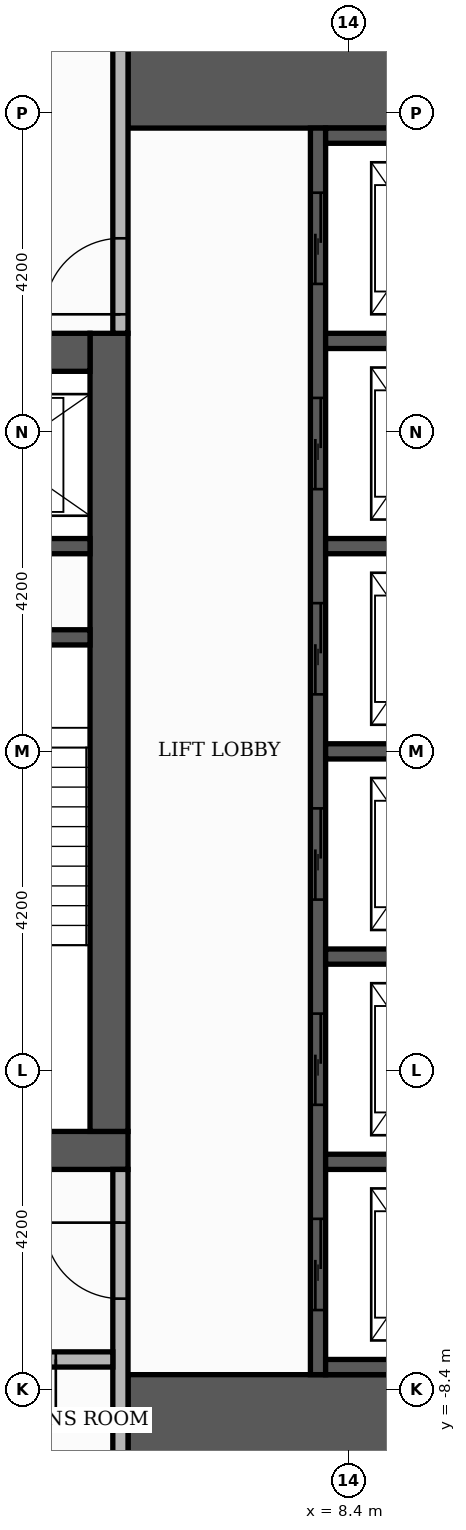
"""IFC4 building model, lengths in metres.
Left out: names, types, materials, properties, quantities, classifications, styles, units other than length and angle.
Written with IfcOpenShell. Run it as: python <this file> out.ifc"""

import sys

from ifc_helpers import new_model, si_unit, direction, frame, frame_2d, origin, place, context, subcontext, project, spatial, rectangle, extrude, element, fill, save


model = new_model("IFC4")
c1 = context("Model", 3, precision=1e-05, world=origin(), true_north=direction((0.0, 1.0)))
c2 = subcontext(c1, "Body", "Model", "MODEL_VIEW")
j1 = project(units=[si_unit("LENGTHUNIT", "METRE"), si_unit("PLANEANGLEUNIT", "RADIAN")], contexts=[c1])
p1 = place(None, origin())
s1 = spatial("IfcSite", under=j1, at=p1, CompositionType="ELEMENT")
p2 = place(p1, origin())
s2 = spatial("IfcBuilding", under=s1, at=p2, CompositionType="ELEMENT")
p3 = place(p2, frame((0.0, 0.0, 176.7)))
s3 = spatial("IfcBuildingStorey", under=s2, at=p3, CompositionType="ELEMENT", Elevation=176.7)
p4 = place(p3, frame((-5.5, -5.25, 0.0), z_axis=(0.0, 0.0, 1.0), x_axis=(1.0, 0.0, 0.0)))
e1 = element("IfcWall", 1, at=p4, inside=s3, PredefinedType="SHEAR", context=c2, shape_type="SweptSolid", body=[
    extrude(rectangle(XDim=11.0, YDim=0.5, at=frame_2d((5.5, 0.0))), origin(), (0.0, 0.0, 1.0), 3.4),
])
p5 = place(p4, frame((4.9, 0.0, 0.0)))
e2 = element("IfcOpeningElement", 2, at=p5, cuts=e1, PredefinedType="OPENING", context=c2, shape_type="SweptSolid", body=[
    extrude(rectangle(XDim=1.2, YDim=2.1, at=frame_2d((0.6, 1.05))), frame((0.0, 0.26, 0.0), z_axis=(0.0, -1.0, 0.0), x_axis=(1.0, 0.0, 0.0)), (0.0, 0.0, 1.0), 0.52),
])
p6 = place(p3, frame((5.25, -5.0, 0.0), z_axis=(0.0, 0.0, 1.0), x_axis=(0.0, 1.0, 0.0)))
e3 = element("IfcWall", 3, at=p6, inside=s3, PredefinedType="SHEAR", context=c2, shape_type="SweptSolid", body=[
    extrude(rectangle(XDim=10.5, YDim=0.5, at=frame_2d((5.25, 0.0))), origin(), (0.0, 0.0, 1.0), 3.4),
])
p7 = place(p3, frame((-5.0, 5.25, 0.0), z_axis=(0.0, 0.0, 1.0), x_axis=(1.0, 0.0, 0.0)))
e4 = element("IfcWall", 4, at=p7, inside=s3, PredefinedType="SHEAR", context=c2, shape_type="SweptSolid", body=[
    extrude(rectangle(XDim=10.0, YDim=0.5, at=frame_2d((5.0, 0.0))), origin(), (0.0, 0.0, 1.0), 3.4),
])
p8 = place(p7, frame((4.4, 0.0, 0.0)))
e5 = element("IfcOpeningElement", 5, at=p8, cuts=e4, PredefinedType="OPENING", context=c2, shape_type="SweptSolid", body=[
    extrude(rectangle(XDim=1.2, YDim=2.1, at=frame_2d((0.6, 1.05))), frame((0.0, 0.26, 0.0), z_axis=(0.0, -1.0, 0.0), x_axis=(1.0, 0.0, 0.0)), (0.0, 0.0, 1.0), 0.52),
])
for number, where, z_axis, x_axis in (
    (6, (5.5, -9.15, 0.0), (0.0, 0.0, 1.0), (1.0, 0.0, 0.0)),
    (7, (5.5, 9.15, 0.0), (0.0, 0.0, 1.0), (1.0, 0.0, 0.0)),
):
    element("IfcWall", number, at=place(p3, frame(where, z_axis=z_axis, x_axis=x_axis)), inside=s3, PredefinedType="SHEAR", context=c2, shape_type="SweptSolid", body=[
        extrude(rectangle(XDim=4.6, YDim=1.9, at=frame_2d((2.3, 0.0))), origin(), (0.0, 0.0, 1.0), 3.4),
    ])
p9 = place(p3, frame((2.15, 1.5, 0.0), z_axis=(0.0, 0.0, 1.0), x_axis=(1.0, 0.0, 0.0)))
e8 = element("IfcWall", 8, at=p9, inside=s3, PredefinedType="SHEAR", context=c2, shape_type="SweptSolid", body=[
    extrude(rectangle(XDim=2.85, YDim=0.2, at=frame_2d((1.425, 0.0))), origin(), (0.0, 0.0, 1.0), 3.4),
])
p10 = place(p3, frame((8.0, -8.2, 0.0), z_axis=(0.0, 0.0, 1.0), x_axis=(0.0, 1.0, 0.0)))
e9 = element("IfcWall", 9, at=p10, inside=s3, PredefinedType="SHEAR", context=c2, shape_type="SweptSolid", body=[
    extrude(rectangle(XDim=16.4, YDim=0.2, at=frame_2d((8.2, 0.0))), origin(), (0.0, 0.0, 1.0), 3.4),
])
p11 = place(p10, frame((0.85, 0.0, 0.0)))
e10 = element("IfcOpeningElement", 10, at=p11, cuts=e9, PredefinedType="OPENING", context=c2, shape_type="SweptSolid", body=[
    extrude(rectangle(XDim=1.2, YDim=2.1, at=frame_2d((0.6, 1.05))), frame((0.0, 0.11, 0.0), z_axis=(0.0, -1.0, 0.0), x_axis=(1.0, 0.0, 0.0)), (0.0, 0.0, 1.0), 0.22),
])
p12 = place(p10, frame((3.55, 0.0, 0.0)))
e11 = element("IfcOpeningElement", 11, at=p12, cuts=e9, PredefinedType="OPENING", context=c2, shape_type="SweptSolid", body=[
    extrude(rectangle(XDim=1.2, YDim=2.1, at=frame_2d((0.6, 1.05))), frame((0.0, 0.11, 0.0), z_axis=(0.0, -1.0, 0.0), x_axis=(1.0, 0.0, 0.0)), (0.0, 0.0, 1.0), 0.22),
])
p13 = place(p10, frame((6.25, 0.0, 0.0)))
e12 = element("IfcOpeningElement", 12, at=p13, cuts=e9, PredefinedType="OPENING", context=c2, shape_type="SweptSolid", body=[
    extrude(rectangle(XDim=1.2, YDim=2.1, at=frame_2d((0.6, 1.05))), frame((0.0, 0.11, 0.0), z_axis=(0.0, -1.0, 0.0), x_axis=(1.0, 0.0, 0.0)), (0.0, 0.0, 1.0), 0.22),
])
p14 = place(p10, frame((8.95, 0.0, 0.0)))
e13 = element("IfcOpeningElement", 13, at=p14, cuts=e9, PredefinedType="OPENING", context=c2, shape_type="SweptSolid", body=[
    extrude(rectangle(XDim=1.2, YDim=2.1, at=frame_2d((0.6, 1.05))), frame((0.0, 0.11, 0.0), z_axis=(0.0, -1.0, 0.0), x_axis=(1.0, 0.0, 0.0)), (0.0, 0.0, 1.0), 0.22),
])
p15 = place(p10, frame((11.65, 0.0, 0.0)))
e14 = element("IfcOpeningElement", 14, at=p15, cuts=e9, PredefinedType="OPENING", context=c2, shape_type="SweptSolid", body=[
    extrude(rectangle(XDim=1.2, YDim=2.1, at=frame_2d((0.6, 1.05))), frame((0.0, 0.11, 0.0), z_axis=(0.0, -1.0, 0.0), x_axis=(1.0, 0.0, 0.0)), (0.0, 0.0, 1.0), 0.22),
])
p16 = place(p10, frame((14.35, 0.0, 0.0)))
e15 = element("IfcOpeningElement", 15, at=p16, cuts=e9, PredefinedType="OPENING", context=c2, shape_type="SweptSolid", body=[
    extrude(rectangle(XDim=1.2, YDim=2.1, at=frame_2d((0.6, 1.05))), frame((0.0, 0.11, 0.0), z_axis=(0.0, -1.0, 0.0), x_axis=(1.0, 0.0, 0.0)), (0.0, 0.0, 1.0), 0.22),
])
for number, where, z_axis, x_axis in (
    (16, (8.1, -8.1, 0.0), (0.0, 0.0, 1.0), (1.0, 0.0, 0.0)),
    (17, (8.1, -5.4, 0.0), (0.0, 0.0, 1.0), (1.0, 0.0, 0.0)),
    (18, (8.1, -2.7, 0.0), (0.0, 0.0, 1.0), (1.0, 0.0, 0.0)),
    (19, (8.1, 0.0, 0.0), (0.0, 0.0, 1.0), (1.0, 0.0, 0.0)),
):
    element("IfcWall", number, at=place(p3, frame(where, z_axis=z_axis, x_axis=x_axis)), inside=s3, PredefinedType="SHEAR", context=c2, shape_type="SweptSolid", body=[
        extrude(rectangle(XDim=2.0, YDim=0.2, at=frame_2d((1.0, 0.0))), origin(), (0.0, 0.0, 1.0), 3.4),
    ])
p17 = place(p3, frame((2.15, 2.7, 0.0), z_axis=(0.0, 0.0, 1.0), x_axis=(1.0, 0.0, 0.0)))
e20 = element("IfcWall", 20, at=p17, inside=s3, PredefinedType="SHEAR", context=c2, shape_type="SweptSolid", body=[
    extrude(rectangle(XDim=2.85, YDim=0.2, at=frame_2d((1.425, 0.0))), origin(), (0.0, 0.0, 1.0), 3.4),
])
for number, where, z_axis, x_axis in (
    (21, (8.1, 2.7, 0.0), (0.0, 0.0, 1.0), (1.0, 0.0, 0.0)),
    (22, (8.1, 5.4, 0.0), (0.0, 0.0, 1.0), (1.0, 0.0, 0.0)),
    (23, (8.1, 8.1, 0.0), (0.0, 0.0, 1.0), (1.0, 0.0, 0.0)),
):
    element("IfcWall", number, at=place(p3, frame(where, z_axis=z_axis, x_axis=x_axis)), inside=s3, PredefinedType="SHEAR", context=c2, shape_type="SweptSolid", body=[
        extrude(rectangle(XDim=2.0, YDim=0.2, at=frame_2d((1.0, 0.0))), origin(), (0.0, 0.0, 1.0), 3.4),
    ])
p18 = place(p3, frame((5.4, -10.1, 0.0), z_axis=(0.0, 0.0, 1.0), x_axis=(0.0, 1.0, 0.0)))
e24 = element("IfcWall", 24, at=p18, inside=s3, PredefinedType="PARTITIONING", context=c2, shape_type="SweptSolid", body=[
    extrude(rectangle(XDim=4.6, YDim=0.2, at=frame_2d((2.3, 0.0))), origin(), (0.0, 0.0, 1.0), 3.4),
])
p19 = place(p18, frame((2.9, 0.0, 0.0)))
e25 = element("IfcOpeningElement", 25, at=p19, cuts=e24, PredefinedType="OPENING", context=c2, shape_type="SweptSolid", body=[
    extrude(rectangle(XDim=1.0, YDim=2.1, at=frame_2d((0.5, 1.05))), frame((0.0, 0.11, 0.0), z_axis=(0.0, -1.0, 0.0), x_axis=(1.0, 0.0, 0.0)), (0.0, 0.0, 1.0), 0.22),
])
p20 = place(p3, frame((2.95, -8.0, 0.0), z_axis=(0.0, 0.0, 1.0), x_axis=(1.0, 0.0, 0.0)))
e26 = element("IfcWall", 26, at=p20, inside=s3, PredefinedType="PARTITIONING", context=c2, shape_type="SweptSolid", body=[
    extrude(rectangle(XDim=2.35, YDim=0.2, at=frame_2d((1.175, 0.0))), origin(), (0.0, 0.0, 1.0), 3.4),
])
p21 = place(p20, frame((0.7, 0.0, 0.0)))
e27 = element("IfcOpeningElement", 27, at=p21, cuts=e26, PredefinedType="OPENING", context=c2, shape_type="SweptSolid", body=[
    extrude(rectangle(XDim=0.9, YDim=2.1, at=frame_2d((0.45, 1.05))), frame((0.0, 0.11, 0.0), z_axis=(0.0, -1.0, 0.0), x_axis=(1.0, 0.0, 0.0)), (0.0, 0.0, 1.0), 0.22),
])
p22 = place(p3, frame((5.4, 5.5, 0.0), z_axis=(0.0, 0.0, 1.0), x_axis=(0.0, 1.0, 0.0)))
e28 = element("IfcWall", 28, at=p22, inside=s3, PredefinedType="PARTITIONING", context=c2, shape_type="SweptSolid", body=[
    extrude(rectangle(XDim=4.6, YDim=0.2, at=frame_2d((2.3, 0.0))), origin(), (0.0, 0.0, 1.0), 3.4),
])
p23 = place(p22, frame((0.25, 0.0, 0.0)))
e29 = element("IfcOpeningElement", 29, at=p23, cuts=e28, PredefinedType="OPENING", context=c2, shape_type="SweptSolid", body=[
    extrude(rectangle(XDim=1.0, YDim=2.1, at=frame_2d((0.5, 1.05))), frame((0.0, 0.11, 0.0), z_axis=(0.0, -1.0, 0.0), x_axis=(1.0, 0.0, 0.0)), (0.0, 0.0, 1.0), 0.22),
])
p24 = place(p11, origin())
e30 = element("IfcDoor", 30, at=p24, inside=s3, OperationType="SLIDING_TO_LEFT", PredefinedType="DOOR", context=c2, shape_type="SweptSolid", body=[
    extrude(rectangle(XDim=1.2, YDim=2.1, at=frame_2d((0.6, 1.05))), frame((0.0, 0.025, 0.0), z_axis=(0.0, -1.0, 0.0), x_axis=(1.0, 0.0, 0.0)), (0.0, 0.0, 1.0), 0.05),
])
fill(e10, e30)
p25 = place(p12, origin())
e31 = element("IfcDoor", 31, at=p25, inside=s3, OperationType="SLIDING_TO_LEFT", PredefinedType="DOOR", context=c2, shape_type="SweptSolid", body=[
    extrude(rectangle(XDim=1.2, YDim=2.1, at=frame_2d((0.6, 1.05))), frame((0.0, 0.025, 0.0), z_axis=(0.0, -1.0, 0.0), x_axis=(1.0, 0.0, 0.0)), (0.0, 0.0, 1.0), 0.05),
])
fill(e11, e31)
p26 = place(p13, origin())
e32 = element("IfcDoor", 32, at=p26, inside=s3, OperationType="SLIDING_TO_LEFT", PredefinedType="DOOR", context=c2, shape_type="SweptSolid", body=[
    extrude(rectangle(XDim=1.2, YDim=2.1, at=frame_2d((0.6, 1.05))), frame((0.0, 0.025, 0.0), z_axis=(0.0, -1.0, 0.0), x_axis=(1.0, 0.0, 0.0)), (0.0, 0.0, 1.0), 0.05),
])
fill(e12, e32)
p27 = place(p14, origin())
e33 = element("IfcDoor", 33, at=p27, inside=s3, OperationType="SLIDING_TO_LEFT", PredefinedType="DOOR", context=c2, shape_type="SweptSolid", body=[
    extrude(rectangle(XDim=1.2, YDim=2.1, at=frame_2d((0.6, 1.05))), frame((0.0, 0.025, 0.0), z_axis=(0.0, -1.0, 0.0), x_axis=(1.0, 0.0, 0.0)), (0.0, 0.0, 1.0), 0.05),
])
fill(e13, e33)
p28 = place(p15, origin())
e34 = element("IfcDoor", 34, at=p28, inside=s3, OperationType="SLIDING_TO_LEFT", PredefinedType="DOOR", context=c2, shape_type="SweptSolid", body=[
    extrude(rectangle(XDim=1.2, YDim=2.1, at=frame_2d((0.6, 1.05))), frame((0.0, 0.025, 0.0), z_axis=(0.0, -1.0, 0.0), x_axis=(1.0, 0.0, 0.0)), (0.0, 0.0, 1.0), 0.05),
])
fill(e14, e34)
p29 = place(p16, origin())
e35 = element("IfcDoor", 35, at=p29, inside=s3, OperationType="SLIDING_TO_LEFT", PredefinedType="DOOR", context=c2, shape_type="SweptSolid", body=[
    extrude(rectangle(XDim=1.2, YDim=2.1, at=frame_2d((0.6, 1.05))), frame((0.0, 0.025, 0.0), z_axis=(0.0, -1.0, 0.0), x_axis=(1.0, 0.0, 0.0)), (0.0, 0.0, 1.0), 0.05),
])
fill(e15, e35)
p30 = place(p23, origin())
e36 = element("IfcDoor", 36, at=p30, inside=s3, OperationType="SINGLE_SWING_LEFT", PredefinedType="DOOR", context=c2, shape_type="SweptSolid", body=[
    extrude(rectangle(XDim=1.0, YDim=2.1, at=frame_2d((0.5, 1.05))), frame((0.0, 0.025, 0.0), z_axis=(0.0, -1.0, 0.0), x_axis=(1.0, 0.0, 0.0)), (0.0, 0.0, 1.0), 0.05),
])
fill(e29, e36)
p31 = place(p19, origin())
e37 = element("IfcDoor", 37, at=p31, inside=s3, OperationType="SINGLE_SWING_RIGHT", PredefinedType="DOOR", context=c2, shape_type="SweptSolid", body=[
    extrude(rectangle(XDim=1.0, YDim=2.1, at=frame_2d((0.5, 1.05))), frame((0.0, 0.025, 0.0), z_axis=(0.0, -1.0, 0.0), x_axis=(1.0, 0.0, 0.0)), (0.0, 0.0, 1.0), 0.05),
])
fill(e25, e37)
p32 = place(p21, frame((0.9, 0.0, 0.0), z_axis=(0.0, 0.0, 1.0), x_axis=(-1.0, 0.0, 0.0)))
e38 = element("IfcDoor", 38, at=p32, inside=s3, OperationType="SINGLE_SWING_RIGHT", PredefinedType="DOOR", context=c2, shape_type="SweptSolid", body=[
    extrude(rectangle(XDim=0.9, YDim=2.1, at=frame_2d((0.45, 1.05))), frame((0.0, 0.025, 0.0), z_axis=(0.0, -1.0, 0.0), x_axis=(1.0, 0.0, 0.0)), (0.0, 0.0, 1.0), 0.05),
])
fill(e27, e38)
save(model, sys.argv[1])
